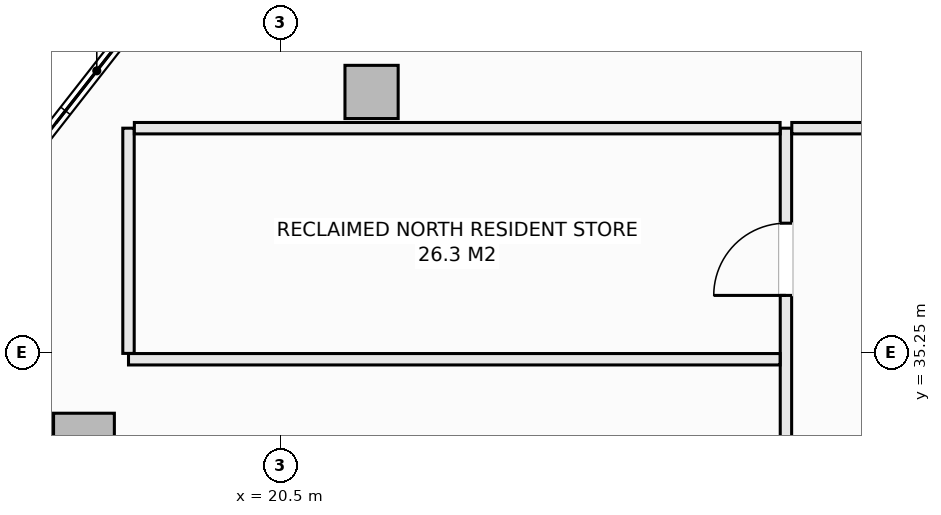
"""IFC4 building model, lengths in metres.
Left out: names, types, materials, properties, quantities, classifications, styles, units other than length and angle.
Written with IfcOpenShell. Run it as: python <this file> out.ifc"""

import sys

from ifc_helpers import new_model, si_unit, direction, frame, frame_2d, origin, origin_2d, place, context, subcontext, project, spatial, rectangle, extrude, element, fill, save


model = new_model("IFC4")
c1 = context("Model", 3, precision=1e-05, world=origin(), true_north=direction((0.0, 1.0)))
c2 = subcontext(c1, "Body", "Model", "MODEL_VIEW")
j1 = project(units=[si_unit("LENGTHUNIT", "METRE"), si_unit("PLANEANGLEUNIT", "RADIAN")], contexts=[c1])
p1 = place(None, origin())
s1 = spatial("IfcSite", under=j1, at=p1, CompositionType="ELEMENT")
p2 = place(p1, origin())
s2 = spatial("IfcBuilding", under=s1, at=p2, CompositionType="ELEMENT")
p3 = place(p2, frame((0.0, 0.0, 259.1)))
s3 = spatial("IfcBuildingStorey", under=s2, at=p3, CompositionType="ELEMENT", Elevation=259.1)
p4 = place(p3, frame((21.698, 38.677, -0.27), z_axis=(0.0, 0.0, 1.0), x_axis=(1.0, 0.0, 0.0)))
e1 = element("IfcColumn", 1, at=p4, inside=s3, PredefinedType="COLUMN", context=c2, shape_type="SweptSolid", body=[
    extrude(rectangle(XDim=0.7, YDim=0.7, at=origin_2d()), origin(), (0.0, 0.0, 1.0), 3.3),
])
p5 = place(p3, frame((17.914, 34.05, -0.27), z_axis=(0.0, 0.0, 1.0), x_axis=(1.0, 0.0, 0.0)))
e2 = element("IfcColumn", 2, at=p5, inside=s3, PredefinedType="PILASTER", context=c2, shape_type="SweptSolid", body=[
    extrude(rectangle(XDim=0.8, YDim=0.8, at=origin_2d()), origin(), (0.0, 0.0, 1.0), 3.3),
])
p6 = place(p3, frame((27.15, 34.002, 0.0), z_axis=(0.0, 0.0, 1.0), x_axis=(0.0, 1.0, 0.0)))
e3 = element("IfcWall", 3, at=p6, inside=s3, PredefinedType="PARTITIONING", context=c2, shape_type="SweptSolid", body=[
    extrude(rectangle(XDim=4.198, YDim=0.15, at=frame_2d((2.099, 0.0))), origin(), (0.0, 0.0, 1.0), 3.03),
])
p7 = place(p6, frame((1.998, 0.0, 0.0)))
e4 = element("IfcOpeningElement", 4, at=p7, cuts=e3, PredefinedType="OPENING", context=c2, shape_type="SweptSolid", body=[
    extrude(rectangle(XDim=0.95, YDim=2.1, at=frame_2d((0.475, 1.05))), frame((0.0, 0.085, 0.0), z_axis=(0.0, -1.0, 0.0), x_axis=(1.0, 0.0, 0.0)), (0.0, 0.0, 1.0), 0.17),
])
p8 = place(p3, frame((18.5, 35.16, 0.0), z_axis=(0.0, 0.0, 1.0), x_axis=(1.0, 0.0, 0.0)))
e5 = element("IfcWall", 5, at=p8, inside=s3, PredefinedType="PARTITIONING", context=c2, shape_type="SweptSolid", body=[
    extrude(rectangle(XDim=8.573, YDim=0.15, at=frame_2d((4.287, 0.0))), origin(), (0.0, 0.0, 1.0), 3.03),
])
p9 = place(p3, frame((18.5, 35.237, 0.0), z_axis=(0.0, 0.0, 1.0), x_axis=(0.0, 1.0, 0.0)))
e6 = element("IfcWall", 6, at=p9, inside=s3, PredefinedType="PARTITIONING", context=c2, shape_type="SweptSolid", body=[
    extrude(rectangle(XDim=2.963, YDim=0.15, at=frame_2d((1.481, 0.0))), origin(), (0.0, 0.0, 1.0), 3.03),
])
p10 = place(p3, frame((18.577, 38.2, 0.0), z_axis=(0.0, 0.0, 1.0), x_axis=(1.0, 0.0, 0.0)))
e7 = element("IfcWall", 7, at=p10, inside=s3, PredefinedType="PARTITIONING", context=c2, shape_type="SweptSolid", body=[
    extrude(rectangle(XDim=8.496, YDim=0.15, at=frame_2d((4.248, 0.0))), origin(), (0.0, 0.0, 1.0), 3.03),
])
p11 = place(p3, frame((27.227, 38.2, 0.0), z_axis=(0.0, 0.0, 1.0), x_axis=(1.0, 0.0, 0.0)))
e8 = element("IfcWall", 8, at=p11, inside=s3, PredefinedType="PARTITIONING", context=c2, shape_type="SweptSolid", body=[
    extrude(rectangle(XDim=2.733, YDim=0.15, at=frame_2d((1.366, 0.0))), origin(), (0.0, 0.0, 1.0), 3.03),
])
p12 = place(p7, origin())
e9 = element("IfcDoor", 9, at=p12, inside=s3, OperationType="SINGLE_SWING_LEFT", PredefinedType="DOOR", context=c2, shape_type="SweptSolid", body=[
    extrude(rectangle(XDim=0.95, YDim=2.1, at=frame_2d((0.475, 1.05))), frame((0.0, 0.025, 0.0), z_axis=(0.0, -1.0, 0.0), x_axis=(1.0, 0.0, 0.0)), (0.0, 0.0, 1.0), 0.05),
])
fill(e4, e9)
save(model, sys.argv[1])
